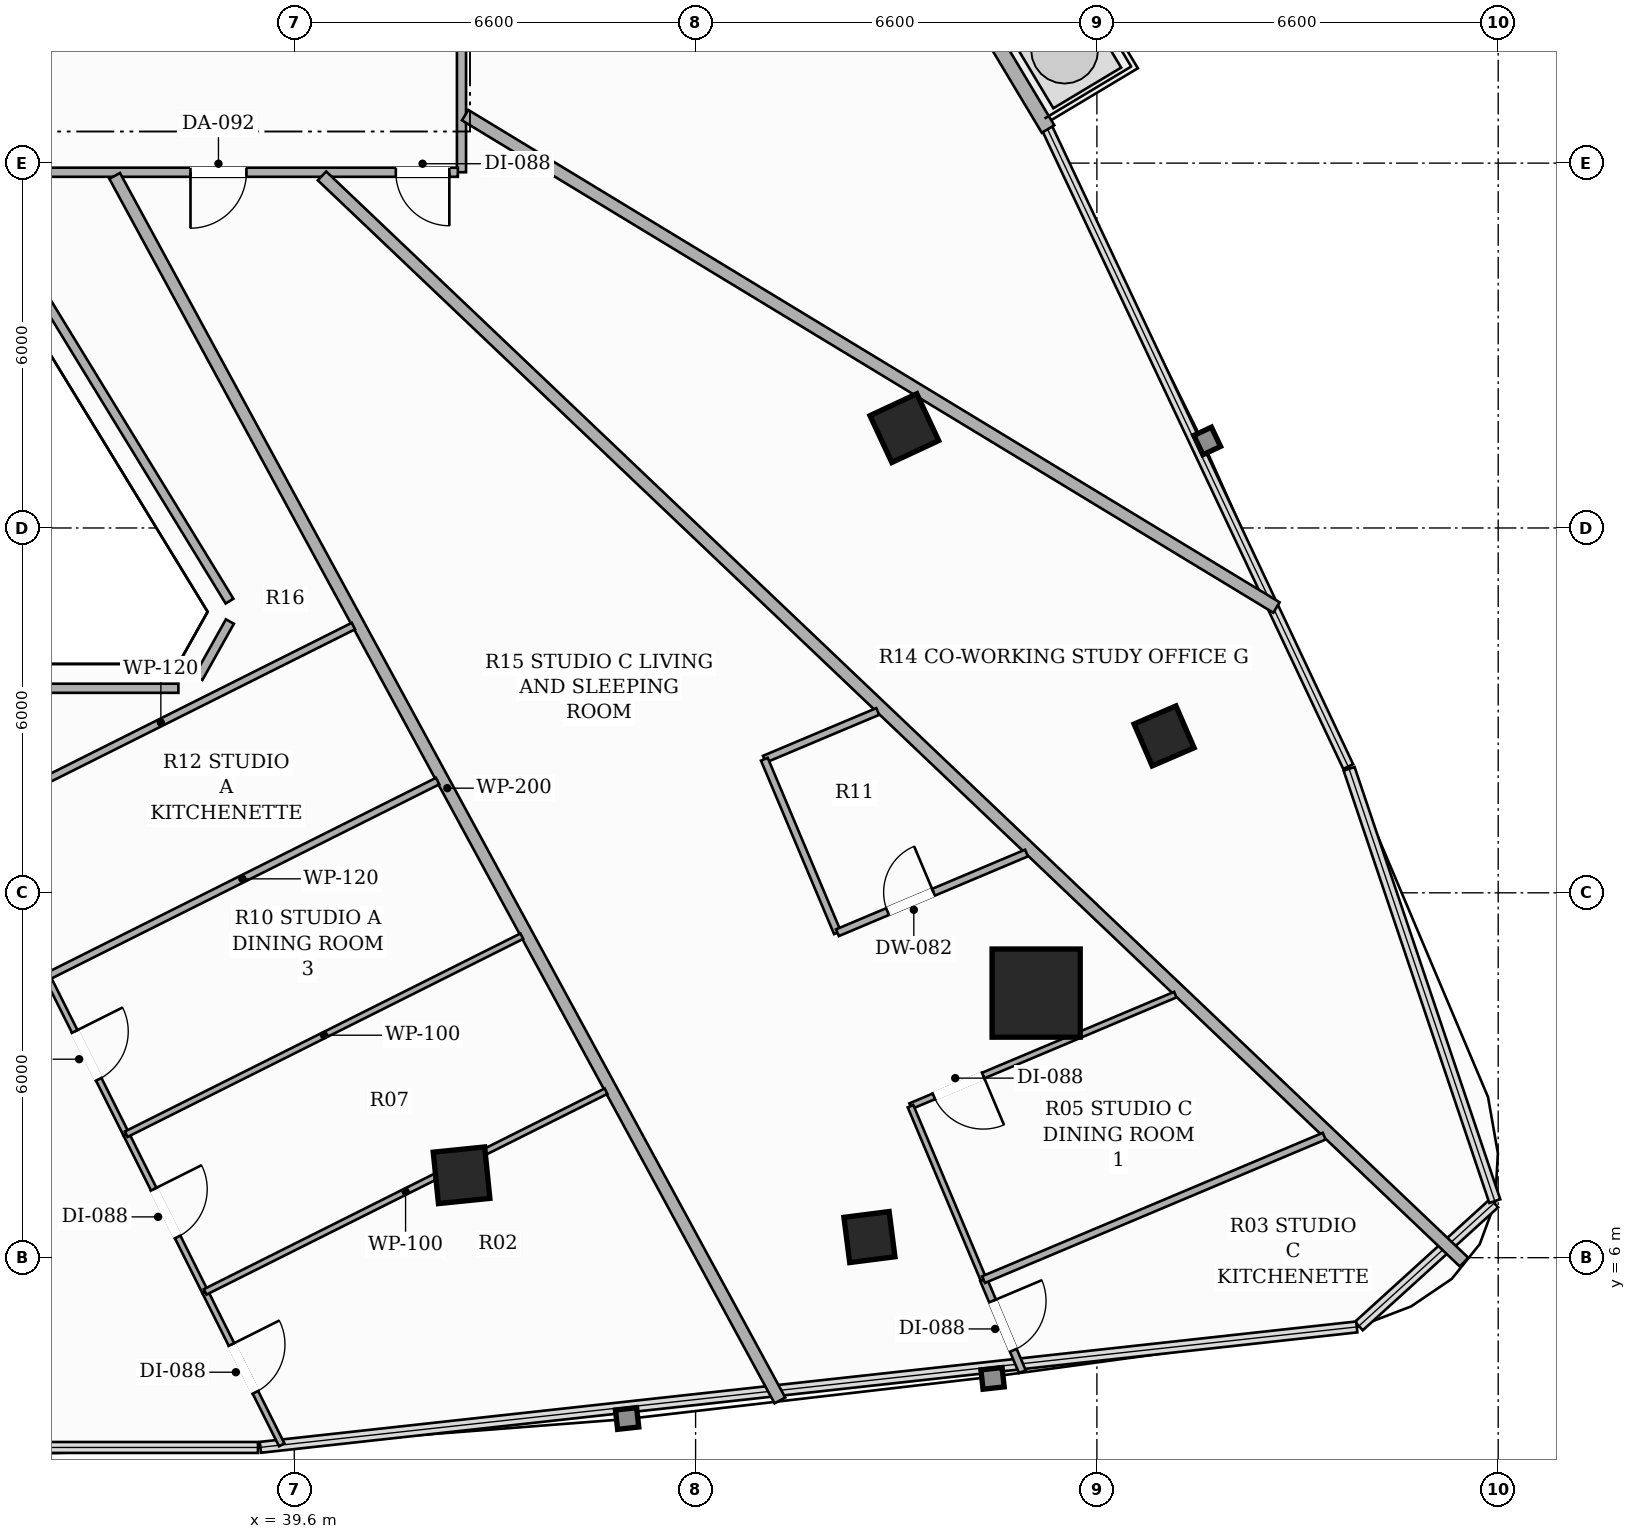
"""IFC4 building model, lengths in metres.
Left out: names, types, materials, properties, quantities, classifications, styles, units other than length and angle.
Written with IfcOpenShell. Run it as: python <this file> out.ifc"""

import sys

from ifc_helpers import new_model, si_unit, direction, frame, frame_2d, origin, origin_2d, place, context, subcontext, project, spatial, rectangle, hollow_rectangle, extrude, element, fill, save


model = new_model("IFC4")
c1 = context("Model", 3, precision=1e-05, world=origin(), true_north=direction((0.0, 1.0)))
c2 = subcontext(c1, "Body", "Model", "MODEL_VIEW")
j1 = project(units=[si_unit("LENGTHUNIT", "METRE"), si_unit("PLANEANGLEUNIT", "RADIAN")], contexts=[c1])
p1 = place(None, origin())
s1 = spatial("IfcSite", under=j1, at=p1, CompositionType="ELEMENT")
p2 = place(p1, origin())
s2 = spatial("IfcBuilding", under=s1, at=p2, CompositionType="ELEMENT")
p3 = place(p2, frame((0.0, 0.0, 106.7)))
s3 = spatial("IfcBuildingStorey", under=s2, at=p3, CompositionType="ELEMENT", Elevation=106.7)
p4 = place(p3, frame((51.801, 10.351, 0.0), z_axis=(0.0, 0.0, 1.0), x_axis=(1.0, 0.0, 0.0)))
e1 = element("IfcColumn", 1, at=p4, inside=s3, PredefinedType="COLUMN", context=c2, shape_type="SweptSolid", body=[
    extrude(hollow_rectangle(XDim=1.45, YDim=1.45, WallThickness=0.045, at=origin_2d()), origin(), (0.0, 0.0, 1.0), 3.3),
])
for number, where, z_axis, x_axis in (
    (2, (42.351, 7.355, 0.0), (0.0, 0.0, 1.0), (0.995, 0.101, 0.0)),
    (3, (49.633, 19.642, 0.0), (0.0, 0.0, 1.0), (-0.423, 0.906, 0.0)),
):
    element("IfcColumn", number, at=place(p3, frame(where, z_axis=z_axis, x_axis=x_axis)), inside=s3, PredefinedType="COLUMN", context=c2, shape_type="SweptSolid", body=[
        extrude(hollow_rectangle(XDim=0.85, YDim=0.85, WallThickness=0.028, at=origin_2d()), origin(), (0.0, 0.0, 1.0), 3.3),
    ])
for number, where, z_axis, x_axis in (
    (4, (49.059, 6.339, 0.0), (0.0, 0.0, 1.0), (0.992, 0.127, 0.0)),
    (5, (53.905, 14.58, 0.0), (0.0, 0.0, 1.0), (-0.397, 0.918, 0.0)),
):
    element("IfcColumn", number, at=place(p3, frame(where, z_axis=z_axis, x_axis=x_axis)), inside=s3, PredefinedType="COLUMN", context=c2, shape_type="SweptSolid", body=[
        extrude(hollow_rectangle(XDim=0.75, YDim=0.75, WallThickness=0.025, at=origin_2d()), origin(), (0.0, 0.0, 1.0), 3.3),
    ])
p5 = place(p3, frame((51.997, 24.561, 0.0), z_axis=(0.0, 0.0, 1.0), x_axis=(-0.514362369366, 0.857572943242, 0.0)))
e6 = element("IfcWall", 6, at=p5, inside=s3, PredefinedType="SOLIDWALL", context=c2, shape_type="SweptSolid", body=[
    extrude(rectangle(XDim=11.844, YDim=0.24, at=frame_2d((5.922, 0.0))), origin(), (0.0, 0.0, 1.0), 2.624),
])
p6 = place(p5, frame((9.346, 0.0, 0.0)))
e7 = element("IfcOpeningElement", 7, at=p6, cuts=e6, PredefinedType="OPENING", context=c2, shape_type="SweptSolid", body=[
    extrude(rectangle(XDim=1.8, YDim=2.2, at=frame_2d((0.9, 1.1))), frame((0.0, 0.13, 0.0), z_axis=(0.0, -1.0, 0.0), x_axis=(1.0, 0.0, 0.0)), (0.0, 0.0, 1.0), 0.26),
])
p7 = place(p3, frame((42.35, 28.34, 0.0), z_axis=(0.0, 0.0, 1.0), x_axis=(0.0, -1.0, 0.0)))
e8 = element("IfcWall", 8, at=p7, inside=s3, PredefinedType="PARTITIONING", context=c2, shape_type="SweptSolid", body=[
    extrude(rectangle(XDim=4.49, YDim=0.15, at=frame_2d((2.245, 0.0))), origin(), (0.0, 0.0, 1.0), 2.721),
])
p8 = place(p7, frame((1.486, 0.0, 0.0)))
e9 = element("IfcOpeningElement", 9, at=p8, cuts=e8, PredefinedType="OPENING", context=c2, shape_type="SweptSolid", body=[
    extrude(rectangle(XDim=0.88, YDim=2.1, at=frame_2d((0.44, 1.05))), frame((0.0, 0.085, 0.0), z_axis=(0.0, -1.0, 0.0), x_axis=(1.0, 0.0, 0.0)), (0.0, 0.0, 1.0), 0.17),
])
p9 = place(p3, frame((42.29, 23.85, 0.0), z_axis=(0.0, 0.0, 1.0), x_axis=(-1.0, 0.0, 0.0)))
e10 = element("IfcWall", 10, at=p9, inside=s3, PredefinedType="PARTITIONING", context=c2, shape_type="SweptSolid", body=[
    extrude(rectangle(XDim=8.065, YDim=0.15, at=frame_2d((4.032, 0.0))), origin(), (0.0, 0.0, 1.0), 2.492),
])
p10 = place(p9, frame((3.477, 0.0, 0.0)))
e11 = element("IfcOpeningElement", 11, at=p10, cuts=e10, PredefinedType="OPENING", context=c2, shape_type="SweptSolid", body=[
    extrude(rectangle(XDim=0.92, YDim=2.15, at=frame_2d((0.46, 1.075))), frame((0.0, 0.085, 0.0), z_axis=(0.0, -1.0, 0.0), x_axis=(1.0, 0.0, 0.0)), (0.0, 0.0, 1.0), 0.17),
])
p11 = place(p9, frame((0.14, 0.0, 0.0)))
e12 = element("IfcOpeningElement", 12, at=p11, cuts=e10, PredefinedType="OPENING", context=c2, shape_type="SweptSolid", body=[
    extrude(rectangle(XDim=0.88, YDim=2.1, at=frame_2d((0.44, 1.05))), frame((0.0, 0.085, 0.0), z_axis=(0.0, -1.0, 0.0), x_axis=(1.0, 0.0, 0.0)), (0.0, 0.0, 1.0), 0.17),
])
p12 = place(p3, frame((34.257, 23.79, 0.0), z_axis=(0.0, 0.0, 1.0), x_axis=(0.521839061235, -0.853043957935, 0.0)))
e13 = element("IfcWall", 13, at=p12, inside=s3, PredefinedType="PARTITIONING", context=c2, shape_type="SweptSolid", body=[
    extrude(rectangle(XDim=8.198, YDim=0.15, at=frame_2d((4.099, 0.0))), origin(), (0.0, 0.0, 1.0), 2.721),
])
p13 = place(p3, frame((38.541, 16.461, 0.0), z_axis=(0.0, 0.0, 1.0), x_axis=(-0.488631416095, -0.872490308946, 0.0)))
e14 = element("IfcWall", 14, at=p13, inside=s3, PredefinedType="PARTITIONING", context=c2, shape_type="SweptSolid", body=[
    extrude(rectangle(XDim=1.06, YDim=0.15, at=frame_2d((0.53, 0.0))), origin(), (0.0, 0.0, 1.0), 3.06),
])
p14 = place(p3, frame((37.694, 15.364, 0.0), z_axis=(0.0, 0.0, 1.0), x_axis=(-1.0, 0.0, 0.0)))
e15 = element("IfcWall", 15, at=p14, inside=s3, PredefinedType="PARTITIONING", context=c2, shape_type="SweptSolid", body=[
    extrude(rectangle(XDim=9.388, YDim=0.15, at=frame_2d((4.694, 0.0))), origin(), (0.0, 0.0, 1.0), 2.721),
])
p15 = place(p3, frame((36.646, 23.79, 0.0), z_axis=(0.0, 0.0, 1.0), x_axis=(0.477391569207, -0.878690667784, 0.0)))
e16 = element("IfcWall", 16, at=p15, inside=s3, PredefinedType="PARTITIONING", context=c2, shape_type="SweptSolid", body=[
    extrude(rectangle(XDim=22.918, YDim=0.2, at=frame_2d((11.459, 0.0))), origin(), (0.0, 0.0, 1.0), 2.413),
])
p16 = place(p3, frame((40.056, 23.79, 0.0), z_axis=(0.0, 0.0, 1.0), x_axis=(0.724633427165, -0.68913452695, 0.0)))
e17 = element("IfcWall", 17, at=p16, inside=s3, PredefinedType="PARTITIONING", context=c2, shape_type="SweptSolid", body=[
    extrude(rectangle(XDim=25.921, YDim=0.2, at=frame_2d((12.96, 0.0))), origin(), (0.0, 0.0, 1.0), 2.413),
])
p17 = place(p3, frame((55.753, 16.692, 0.0), z_axis=(0.0, 0.0, 1.0), x_axis=(-0.85489976131, 0.518793213248, 0.0)))
e18 = element("IfcWall", 18, at=p17, inside=s3, PredefinedType="PARTITIONING", context=c2, shape_type="SweptSolid", body=[
    extrude(rectangle(XDim=15.608, YDim=0.2, at=frame_2d((7.804, 0.0))), origin(), (0.0, 0.0, 1.0), 2.413),
])
p18 = place(p3, frame((38.134, 5.437, 0.0), z_axis=(0.0, 0.0, 1.0), x_axis=(0.447768773835, -0.894149386388, 0.0)))
e19 = element("IfcWall", 19, at=p18, inside=s3, PredefinedType="PARTITIONING", context=c2, shape_type="SweptSolid", body=[
    extrude(rectangle(XDim=2.814, YDim=0.1, at=frame_2d((1.407, 0.0))), origin(), (0.0, 0.0, 1.0), 3.06),
])
p19 = place(p18, frame((0.967, 0.0, 0.0)))
e20 = element("IfcOpeningElement", 20, at=p19, cuts=e19, PredefinedType="OPENING", context=c2, shape_type="SweptSolid", body=[
    extrude(rectangle(XDim=0.88, YDim=2.1, at=frame_2d((0.44, 1.05))), frame((0.0, 0.06, 0.0), z_axis=(0.0, -1.0, 0.0), x_axis=(1.0, 0.0, 0.0)), (0.0, 0.0, 1.0), 0.12),
])
p20 = place(p3, frame((36.836, 8.03, 0.0), z_axis=(0.0, 0.0, 1.0), x_axis=(0.447651342751, -0.894208183441, 0.0)))
e21 = element("IfcWall", 21, at=p20, inside=s3, PredefinedType="PARTITIONING", context=c2, shape_type="SweptSolid", body=[
    extrude(rectangle(XDim=2.9, YDim=0.1, at=frame_2d((1.45, 0.0))), origin(), (0.0, 0.0, 1.0), 2.413),
])
p21 = place(p20, frame((1.01, 0.0, 0.0)))
e22 = element("IfcOpeningElement", 22, at=p21, cuts=e21, PredefinedType="OPENING", context=c2, shape_type="SweptSolid", body=[
    extrude(rectangle(XDim=0.88, YDim=2.1, at=frame_2d((0.44, 1.05))), frame((0.0, 0.06, 0.0), z_axis=(0.0, -1.0, 0.0), x_axis=(1.0, 0.0, 0.0)), (0.0, 0.0, 1.0), 0.12),
])
p22 = place(p3, frame((35.537, 10.623, 0.0), z_axis=(0.0, 0.0, 1.0), x_axis=(0.447853271476, -0.894107066983, 0.0)))
e23 = element("IfcWall", 23, at=p22, inside=s3, PredefinedType="PARTITIONING", context=c2, shape_type="SweptSolid", body=[
    extrude(rectangle(XDim=2.9, YDim=0.1, at=frame_2d((1.45, 0.0))), origin(), (0.0, 0.0, 1.0), 3.06),
])
p23 = place(p22, frame((1.01, 0.0, 0.0)))
e24 = element("IfcOpeningElement", 24, at=p23, cuts=e23, PredefinedType="OPENING", context=c2, shape_type="SweptSolid", body=[
    extrude(rectangle(XDim=0.88, YDim=2.1, at=frame_2d((0.44, 1.05))), frame((0.0, 0.06, 0.0), z_axis=(0.0, -1.0, 0.0), x_axis=(1.0, 0.0, 0.0)), (0.0, 0.0, 1.0), 0.12),
])
p24 = place(p3, frame((40.572, 16.387, 0.0), z_axis=(0.0, 0.0, 1.0), x_axis=(-0.894178861749, -0.447709909653, 0.0)))
e25 = element("IfcWall", 25, at=p24, inside=s3, PredefinedType="PARTITIONING", context=c2, shape_type="SweptSolid", body=[
    extrude(rectangle(XDim=7.083, YDim=0.12, at=frame_2d((3.541, 0.0))), origin(), (0.0, 0.0, 1.0), 2.721),
])
p25 = place(p3, frame((41.957, 13.837, 0.0), z_axis=(0.0, 0.0, 1.0), x_axis=(-0.894209449688, -0.447648813344, 0.0)))
e26 = element("IfcWall", 26, at=p25, inside=s3, PredefinedType="PARTITIONING", context=c2, shape_type="SweptSolid", body=[
    extrude(rectangle(XDim=7.179, YDim=0.12, at=frame_2d((3.59, 0.0))), origin(), (0.0, 0.0, 1.0), 2.721),
])
p26 = place(p3, frame((38.134, 5.437, 0.0), z_axis=(0.0, 0.0, 1.0), x_axis=(0.894182030014, 0.447703581849, 0.0)))
e27 = element("IfcWall", 27, at=p26, inside=s3, PredefinedType="PARTITIONING", context=c2, shape_type="SweptSolid", body=[
    extrude(rectangle(XDim=7.373, YDim=0.1, at=frame_2d((3.687, 0.0))), origin(), (0.0, 0.0, 1.0), 2.413),
])
p27 = place(p3, frame((36.836, 8.03, 0.0), z_axis=(0.0, 0.0, 1.0), x_axis=(0.894205618721, 0.447656465884, 0.0)))
e28 = element("IfcWall", 28, at=p27, inside=s3, PredefinedType="PARTITIONING", context=c2, shape_type="SweptSolid", body=[
    extrude(rectangle(XDim=7.276, YDim=0.1, at=frame_2d((3.638, 0.0))), origin(), (0.0, 0.0, 1.0), 2.721),
])
p28 = place(p3, frame((49.195, 14.982, 0.0), z_axis=(0.0, 0.0, 1.0), x_axis=(-0.921624013763, -0.38808398222, 0.0)))
e29 = element("IfcWall", 29, at=p28, inside=s3, PredefinedType="PARTITIONING", context=c2, shape_type="SweptSolid", body=[
    extrude(rectangle(XDim=2.022, YDim=0.12, at=frame_2d((1.011, 0.0))), origin(), (0.0, 0.0, 1.0), 2.492),
])
p29 = place(p3, frame((47.331, 14.197, 0.0), z_axis=(0.0, 0.0, 1.0), x_axis=(0.388229743903, -0.921562621827, 0.0)))
e30 = element("IfcWall", 30, at=p29, inside=s3, PredefinedType="PARTITIONING", context=c2, shape_type="SweptSolid", body=[
    extrude(rectangle(XDim=3.096, YDim=0.12, at=frame_2d((1.548, 0.0))), origin(), (0.0, 0.0, 1.0), 3.06),
])
p30 = place(p3, frame((48.533, 11.344, 0.0), z_axis=(0.0, 0.0, 1.0), x_axis=(0.921534547548, 0.388296378653, 0.0)))
e31 = element("IfcWall", 31, at=p30, inside=s3, PredefinedType="PARTITIONING", context=c2, shape_type="SweptSolid", body=[
    extrude(rectangle(XDim=3.374, YDim=0.12, at=frame_2d((1.687, 0.0))), origin(), (0.0, 0.0, 1.0), 2.492),
])
p31 = place(p30, frame((0.894, 0.0, 0.0)))
e32 = element("IfcOpeningElement", 32, at=p31, cuts=e31, PredefinedType="OPENING", context=c2, shape_type="SweptSolid", body=[
    extrude(rectangle(XDim=0.82, YDim=2.1, at=frame_2d((0.41, 1.05))), frame((0.0, 0.07, 0.0), z_axis=(0.0, -1.0, 0.0), x_axis=(1.0, 0.0, 0.0)), (0.0, 0.0, 1.0), 0.14),
])
p32 = place(p3, frame((50.936, 5.639, 0.0), z_axis=(0.0, 0.0, 1.0), x_axis=(0.3883160894, -0.92152624201, 0.0)))
e33 = element("IfcWall", 33, at=p32, inside=s3, PredefinedType="PARTITIONING", context=c2, shape_type="SweptSolid", body=[
    extrude(rectangle(XDim=1.643, YDim=0.12, at=frame_2d((0.821, 0.0))), origin(), (0.0, 0.0, 1.0), 2.619),
])
p33 = place(p32, frame((0.381, 0.0, 0.0)))
e34 = element("IfcOpeningElement", 34, at=p33, cuts=e33, PredefinedType="OPENING", context=c2, shape_type="SweptSolid", body=[
    extrude(rectangle(XDim=0.88, YDim=2.1, at=frame_2d((0.44, 1.05))), frame((0.0, 0.07, 0.0), z_axis=(0.0, -1.0, 0.0), x_axis=(1.0, 0.0, 0.0)), (0.0, 0.0, 1.0), 0.14),
])
p34 = place(p3, frame((54.09, 10.326, 0.0), z_axis=(0.0, 0.0, 1.0), x_axis=(-0.921538100995, -0.388287945234, 0.0)))
e35 = element("IfcWall", 35, at=p34, inside=s3, PredefinedType="PARTITIONING", context=c2, shape_type="SweptSolid", body=[
    extrude(rectangle(XDim=4.726, YDim=0.1, at=frame_2d((2.363, 0.0))), origin(), (0.0, 0.0, 1.0), 2.413),
])
p35 = place(p34, frame((3.429, 0.0, 0.0)))
e36 = element("IfcOpeningElement", 36, at=p35, cuts=e35, PredefinedType="OPENING", context=c2, shape_type="SweptSolid", body=[
    extrude(rectangle(XDim=0.88, YDim=2.1, at=frame_2d((0.44, 1.05))), frame((0.0, 0.06, 0.0), z_axis=(0.0, -1.0, 0.0), x_axis=(1.0, 0.0, 0.0)), (0.0, 0.0, 1.0), 0.12),
])
p36 = place(p3, frame((49.735, 8.491, 0.0), z_axis=(0.0, 0.0, 1.0), x_axis=(0.388074634892, -0.921627949746, 0.0)))
e37 = element("IfcWall", 37, at=p36, inside=s3, PredefinedType="PARTITIONING", context=c2, shape_type="SweptSolid", body=[
    extrude(rectangle(XDim=3.094, YDim=0.1, at=frame_2d((1.547, 0.0))), origin(), (0.0, 0.0, 1.0), 2.413),
])
p37 = place(p3, frame((50.936, 5.639, 0.0), z_axis=(0.0, 0.0, 1.0), x_axis=(0.921613448603, 0.388109071466, 0.0)))
e38 = element("IfcWall", 38, at=p37, inside=s3, PredefinedType="PARTITIONING", context=c2, shape_type="SweptSolid", body=[
    extrude(rectangle(XDim=6.079, YDim=0.12, at=frame_2d((3.039, 0.0))), origin(), (0.0, 0.0, 1.0), 2.619),
])
p38 = place(p19, origin())
e39 = element("IfcDoor", 39, at=p38, inside=s3, OperationType="SINGLE_SWING_LEFT", PredefinedType="DOOR", context=c2, shape_type="SweptSolid", body=[
    extrude(rectangle(XDim=0.88, YDim=2.1, at=frame_2d((0.44, 1.05))), frame((0.0, 0.025, 0.0), z_axis=(0.0, -1.0, 0.0), x_axis=(1.0, 0.0, 0.0)), (0.0, 0.0, 1.0), 0.05),
])
fill(e20, e39)
p39 = place(p21, origin())
e40 = element("IfcDoor", 40, at=p39, inside=s3, OperationType="SINGLE_SWING_LEFT", PredefinedType="DOOR", context=c2, shape_type="SweptSolid", body=[
    extrude(rectangle(XDim=0.88, YDim=2.1, at=frame_2d((0.44, 1.05))), frame((0.0, 0.025, 0.0), z_axis=(0.0, -1.0, 0.0), x_axis=(1.0, 0.0, 0.0)), (0.0, 0.0, 1.0), 0.05),
])
fill(e22, e40)
p40 = place(p23, origin())
e41 = element("IfcDoor", 41, at=p40, inside=s3, OperationType="SINGLE_SWING_LEFT", PredefinedType="DOOR", context=c2, shape_type="SweptSolid", body=[
    extrude(rectangle(XDim=0.88, YDim=2.1, at=frame_2d((0.44, 1.05))), frame((0.0, 0.025, 0.0), z_axis=(0.0, -1.0, 0.0), x_axis=(1.0, 0.0, 0.0)), (0.0, 0.0, 1.0), 0.05),
])
fill(e24, e41)
p41 = place(p10, origin())
e42 = element("IfcDoor", 42, at=p41, inside=s3, OperationType="SINGLE_SWING_RIGHT", PredefinedType="DOOR", context=c2, shape_type="SweptSolid", body=[
    extrude(rectangle(XDim=0.92, YDim=2.15, at=frame_2d((0.46, 1.075))), frame((0.0, 0.025, 0.0), z_axis=(0.0, -1.0, 0.0), x_axis=(1.0, 0.0, 0.0)), (0.0, 0.0, 1.0), 0.05),
])
fill(e11, e42)
p42 = place(p31, origin())
e43 = element("IfcDoor", 43, at=p42, inside=s3, OperationType="SINGLE_SWING_RIGHT", PredefinedType="DOOR", context=c2, shape_type="SweptSolid", body=[
    extrude(rectangle(XDim=0.82, YDim=2.1, at=frame_2d((0.41, 1.05))), frame((0.0, 0.025, 0.0), z_axis=(0.0, -1.0, 0.0), x_axis=(1.0, 0.0, 0.0)), (0.0, 0.0, 1.0), 0.05),
])
fill(e32, e43)
p43 = place(p33, origin())
e44 = element("IfcDoor", 44, at=p43, inside=s3, OperationType="SINGLE_SWING_LEFT", PredefinedType="DOOR", context=c2, shape_type="SweptSolid", body=[
    extrude(rectangle(XDim=0.88, YDim=2.1, at=frame_2d((0.44, 1.05))), frame((0.0, 0.025, 0.0), z_axis=(0.0, -1.0, 0.0), x_axis=(1.0, 0.0, 0.0)), (0.0, 0.0, 1.0), 0.05),
])
fill(e34, e44)
p44 = place(p35, origin())
e45 = element("IfcDoor", 45, at=p44, inside=s3, OperationType="SINGLE_SWING_LEFT", PredefinedType="DOOR", context=c2, shape_type="SweptSolid", body=[
    extrude(rectangle(XDim=0.88, YDim=2.1, at=frame_2d((0.44, 1.05))), frame((0.0, 0.025, 0.0), z_axis=(0.0, -1.0, 0.0), x_axis=(1.0, 0.0, 0.0)), (0.0, 0.0, 1.0), 0.05),
])
fill(e36, e45)
p45 = place(p11, origin())
e46 = element("IfcDoor", 46, at=p45, inside=s3, OperationType="SINGLE_SWING_LEFT", PredefinedType="DOOR", context=c2, shape_type="SweptSolid", body=[
    extrude(rectangle(XDim=0.88, YDim=2.1, at=frame_2d((0.44, 1.05))), frame((0.0, 0.025, 0.0), z_axis=(0.0, -1.0, 0.0), x_axis=(1.0, 0.0, 0.0)), (0.0, 0.0, 1.0), 0.05),
])
fill(e12, e46)
save(model, sys.argv[1])
